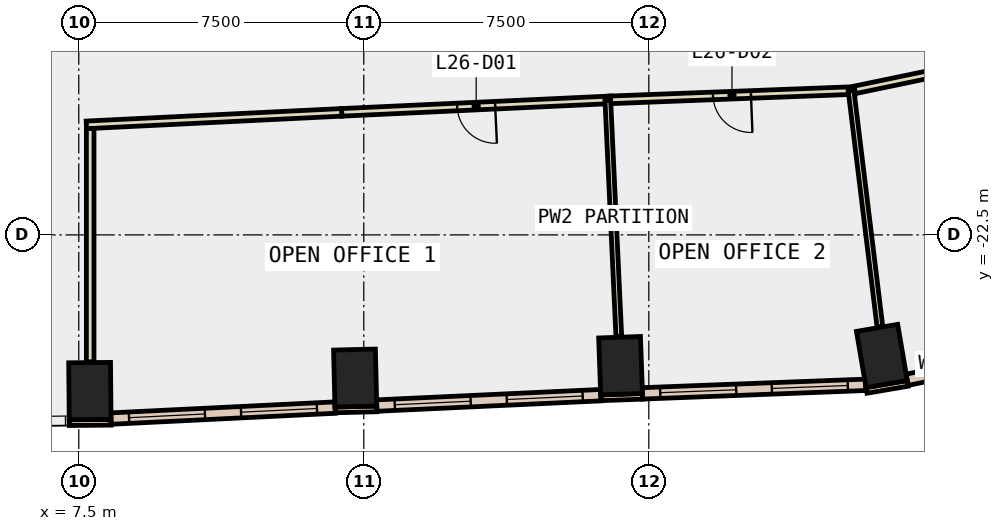
"""IFC4 building model, lengths in metres.
Left out: names, types, materials, properties, quantities, classifications, styles, units other than length and angle.
Written with IfcOpenShell. Run it as: python <this file> out.ifc"""

import sys

from ifc_helpers import new_model, si_unit, direction, frame, frame_2d, origin, origin_2d, place, context, subcontext, project, spatial, rectangle, extrude, element, fill, save


model = new_model("IFC4")
c1 = context("Model", 3, precision=1e-05, world=origin(), true_north=direction((0.0, 1.0)))
c2 = subcontext(c1, "Body", "Model", "MODEL_VIEW")
j1 = project(units=[si_unit("LENGTHUNIT", "METRE"), si_unit("PLANEANGLEUNIT", "RADIAN")], contexts=[c1])
p1 = place(None, origin())
s1 = spatial("IfcSite", under=j1, at=p1, CompositionType="ELEMENT")
p2 = place(p1, origin())
s2 = spatial("IfcBuilding", under=s1, at=p2, CompositionType="ELEMENT")
p3 = place(p2, frame((0.0, 0.0, 120.2)))
s3 = spatial("IfcBuildingStorey", under=s2, at=p3, CompositionType="ELEMENT", Elevation=120.2)
for number, where, z_axis, x_axis in (
    (1, (7.792, -26.61, -0.4), (0.0, 0.0, 1.0), (1.0, 0.009, 0.0)),
    (2, (14.773, -26.267, -0.4), (0.0, 0.0, 1.0), (1.0, 0.024, 0.0)),
    (3, (21.757, -25.942, -0.4), (0.0, 0.0, 1.0), (0.999, 0.035, 0.0)),
    (4, (28.633, -25.686, -0.4), (0.0, 0.0, 1.0), (0.986, 0.168, 0.0)),
):
    element("IfcColumn", number, at=place(p3, frame(where, z_axis=z_axis, x_axis=x_axis)), inside=s3, PredefinedType="COLUMN", context=c2, shape_type="SweptSolid", body=[
        extrude(rectangle(XDim=1.1, YDim=1.5, at=origin_2d()), origin(), (0.0, 0.0, 1.0), 4.2),
    ])
p4 = place(p3, frame((7.249, -27.44, 0.0), z_axis=(0.0, 0.0, 1.0), x_axis=(0.99995860686, 0.009098602504, 0.0)))
e5 = element("IfcWall", 5, at=p4, inside=s3, PredefinedType="STANDARD", context=c2, shape_type="SweptSolid", body=[
    extrude(rectangle(XDim=1.1, YDim=0.15, at=frame_2d((0.55, 0.0))), origin(), (0.0, 0.0, 1.0), 3.8),
])
p5 = place(p3, frame((14.243, -27.105, 0.0), z_axis=(0.0, 0.0, 1.0), x_axis=(0.999723421029, 0.023517683673, 0.0)))
e6 = element("IfcWall", 6, at=p5, inside=s3, PredefinedType="STANDARD", context=c2, shape_type="SweptSolid", body=[
    extrude(rectangle(XDim=1.1, YDim=0.15, at=frame_2d((0.55, 0.0))), origin(), (0.0, 0.0, 1.0), 3.8),
])
p6 = place(p3, frame((21.237, -26.786, 0.0), z_axis=(0.0, 0.0, 1.0), x_axis=(0.999376638472, 0.035303462679, 0.0)))
e7 = element("IfcWall", 7, at=p6, inside=s3, PredefinedType="STANDARD", context=c2, shape_type="SweptSolid", body=[
    extrude(rectangle(XDim=1.1, YDim=0.15, at=frame_2d((0.55, 0.0))), origin(), (0.0, 0.0, 1.0), 3.8),
])
p7 = place(p3, frame((28.229, -26.592, 0.0), z_axis=(0.0, 0.0, 1.0), x_axis=(0.985763338892, 0.168138751323, 0.0)))
e8 = element("IfcWall", 8, at=p7, inside=s3, PredefinedType="STANDARD", context=c2, shape_type="SweptSolid", body=[
    extrude(rectangle(XDim=1.101, YDim=0.15, at=frame_2d((0.55, 0.0))), origin(), (0.0, 0.0, 1.0), 3.8),
])
p8 = place(p3, frame((8.347, -27.333, 0.0), z_axis=(0.0, 0.0, 1.0), x_axis=(0.998800343021, 0.048968099633, 0.0)))
e9 = element("IfcWall", 9, at=p8, inside=s3, PredefinedType="STANDARD", context=c2, shape_type="SweptSolid", body=[
    extrude(rectangle(XDim=5.903, YDim=0.3, at=frame_2d((2.952, 0.0))), origin(), (0.0, 0.0, 1.0), 3.8),
])
p9 = place(p8, frame((0.476, 0.0, 0.9)))
e10 = element("IfcOpeningElement", 10, at=p9, cuts=e9, PredefinedType="OPENING", context=c2, shape_type="SweptSolid", body=[
    extrude(rectangle(XDim=2.0, YDim=2.6, at=frame_2d((1.0, 1.3))), frame((0.0, 0.16, 0.0), z_axis=(0.0, -1.0, 0.0), x_axis=(1.0, 0.0, 0.0)), (0.0, 0.0, 1.0), 0.32),
])
p10 = place(p8, frame((3.427, 0.0, 0.9)))
e11 = element("IfcOpeningElement", 11, at=p10, cuts=e9, PredefinedType="OPENING", context=c2, shape_type="SweptSolid", body=[
    extrude(rectangle(XDim=2.0, YDim=2.6, at=frame_2d((1.0, 1.3))), frame((0.0, 0.16, 0.0), z_axis=(0.0, -1.0, 0.0), x_axis=(1.0, 0.0, 0.0)), (0.0, 0.0, 1.0), 0.32),
])
p11 = place(p3, frame((15.34, -26.991, 0.0), z_axis=(0.0, 0.0, 1.0), x_axis=(0.998922139094, 0.046417238469, 0.0)))
e12 = element("IfcWall", 12, at=p11, inside=s3, PredefinedType="STANDARD", context=c2, shape_type="SweptSolid", body=[
    extrude(rectangle(XDim=5.901, YDim=0.3, at=frame_2d((2.951, 0.0))), origin(), (0.0, 0.0, 1.0), 3.8),
])
p12 = place(p11, frame((0.475, 0.0, 0.9)))
e13 = element("IfcOpeningElement", 13, at=p12, cuts=e12, PredefinedType="OPENING", context=c2, shape_type="SweptSolid", body=[
    extrude(rectangle(XDim=2.0, YDim=2.6, at=frame_2d((1.0, 1.3))), frame((0.0, 0.16, 0.0), z_axis=(0.0, -1.0, 0.0), x_axis=(1.0, 0.0, 0.0)), (0.0, 0.0, 1.0), 0.32),
])
p13 = place(p11, frame((3.426, 0.0, 0.9)))
e14 = element("IfcOpeningElement", 14, at=p13, cuts=e12, PredefinedType="OPENING", context=c2, shape_type="SweptSolid", body=[
    extrude(rectangle(XDim=2.0, YDim=2.6, at=frame_2d((1.0, 1.3))), frame((0.0, 0.16, 0.0), z_axis=(0.0, -1.0, 0.0), x_axis=(1.0, 0.0, 0.0)), (0.0, 0.0, 1.0), 0.32),
])
p14 = place(p3, frame((22.332, -26.67, 0.0), z_axis=(0.0, 0.0, 1.0), x_axis=(0.999267908582, 0.038257638169, 0.0)))
e15 = element("IfcWall", 15, at=p14, inside=s3, PredefinedType="STANDARD", context=c2, shape_type="SweptSolid", body=[
    extrude(rectangle(XDim=5.877, YDim=0.3, at=frame_2d((2.939, 0.0))), origin(), (0.0, 0.0, 1.0), 3.8),
])
p15 = place(p14, frame((0.469, 0.0, 0.9)))
e16 = element("IfcOpeningElement", 16, at=p15, cuts=e15, PredefinedType="OPENING", context=c2, shape_type="SweptSolid", body=[
    extrude(rectangle(XDim=2.0, YDim=2.6, at=frame_2d((1.0, 1.3))), frame((0.0, 0.16, 0.0), z_axis=(0.0, -1.0, 0.0), x_axis=(1.0, 0.0, 0.0)), (0.0, 0.0, 1.0), 0.32),
])
p16 = place(p14, frame((3.408, 0.0, 0.9)))
e17 = element("IfcOpeningElement", 17, at=p16, cuts=e15, PredefinedType="OPENING", context=c2, shape_type="SweptSolid", body=[
    extrude(rectangle(XDim=2.0, YDim=2.6, at=frame_2d((1.0, 1.3))), frame((0.0, 0.16, 0.0), z_axis=(0.0, -1.0, 0.0), x_axis=(1.0, 0.0, 0.0)), (0.0, 0.0, 1.0), 0.32),
])
p17 = place(p3, frame((29.297, -26.313, 0.0), z_axis=(0.0, 0.0, 1.0), x_axis=(0.979080614496, 0.203472726227, 0.0)))
e18 = element("IfcWall", 18, at=p17, inside=s3, PredefinedType="STANDARD", context=c2, shape_type="SweptSolid", body=[
    extrude(rectangle(XDim=4.05, YDim=0.3, at=frame_2d((2.025, 0.0))), origin(), (0.0, 0.0, 1.0), 3.8),
])
p18 = place(p17, frame((1.325, 0.0, 0.9)))
e19 = element("IfcOpeningElement", 19, at=p18, cuts=e18, PredefinedType="OPENING", context=c2, shape_type="SweptSolid", body=[
    extrude(rectangle(XDim=1.4, YDim=2.6, at=frame_2d((0.7, 1.3))), frame((0.0, 0.16, 0.0), z_axis=(0.0, -1.0, 0.0), x_axis=(1.0, 0.0, 0.0)), (0.0, 0.0, 1.0), 0.32),
])
p19 = place(p3, frame((21.496, -18.946, 0.0), z_axis=(0.0, 0.0, 1.0), x_axis=(-0.99891602876, -0.046548549767, 0.0)))
e20 = element("IfcWall", 20, at=p19, inside=s3, PredefinedType="PARTITIONING", context=c2, shape_type="SweptSolid", body=[
    extrude(rectangle(XDim=7.086, YDim=0.2, at=frame_2d((3.543, 0.0))), origin(), (0.0, 0.0, 1.0), 3.8),
])
p20 = place(p19, frame((3.043, 0.0, 0.0)))
e21 = element("IfcOpeningElement", 21, at=p20, cuts=e20, PredefinedType="OPENING", context=c2, shape_type="SweptSolid", body=[
    extrude(rectangle(XDim=1.0, YDim=2.1, at=frame_2d((0.5, 1.05))), frame((0.0, 0.11, 0.0), z_axis=(0.0, -1.0, 0.0), x_axis=(1.0, 0.0, 0.0)), (0.0, 0.0, 1.0), 0.22),
])
p21 = place(p3, frame((14.418, -19.276, 0.0), z_axis=(0.0, 0.0, 1.0), x_axis=(-0.998802248261, -0.04892922305, 0.0)))
e22 = element("IfcWall", 22, at=p21, inside=s3, PredefinedType="PARTITIONING", context=c2, shape_type="SweptSolid", body=[
    extrude(rectangle(XDim=6.726, YDim=0.2, at=frame_2d((3.363, 0.0))), origin(), (0.0, 0.0, 1.0), 3.8),
])
p22 = place(p3, frame((27.922, -18.7, 0.0), z_axis=(0.0, 0.0, 1.0), x_axis=(-0.999265458352, -0.038321583274, 0.0)))
e23 = element("IfcWall", 23, at=p22, inside=s3, PredefinedType="PARTITIONING", context=c2, shape_type="SweptSolid", body=[
    extrude(rectangle(XDim=6.473, YDim=0.2, at=frame_2d((3.236, 0.0))), origin(), (0.0, 0.0, 1.0), 3.8),
])
p23 = place(p22, frame((2.736, 0.0, 0.0)))
e24 = element("IfcOpeningElement", 24, at=p23, cuts=e23, PredefinedType="OPENING", context=c2, shape_type="SweptSolid", body=[
    extrude(rectangle(XDim=1.0, YDim=2.1, at=frame_2d((0.5, 1.05))), frame((0.0, 0.11, 0.0), z_axis=(0.0, -1.0, 0.0), x_axis=(1.0, 0.0, 0.0)), (0.0, 0.0, 1.0), 0.22),
])
p24 = place(p3, frame((30.209, -18.208, 0.0), z_axis=(0.0, 0.0, 1.0), x_axis=(-0.979049860969, -0.203620651545, 0.0)))
e25 = element("IfcWall", 25, at=p24, inside=s3, PredefinedType="PARTITIONING", context=c2, shape_type="SweptSolid", body=[
    extrude(rectangle(XDim=2.338, YDim=0.2, at=frame_2d((1.169, 0.0))), origin(), (0.0, 0.0, 1.0), 3.8),
])
p25 = place(p3, frame((7.8, -19.701, 0.0), z_axis=(0.0, 0.0, 1.0), x_axis=(0.0, -1.0, 0.0)))
e26 = element("IfcWall", 26, at=p25, inside=s3, PredefinedType="PARTITIONING", context=c2, shape_type="SweptSolid", body=[
    extrude(rectangle(XDim=6.139, YDim=0.2, at=frame_2d((3.07, 0.0))), origin(), (0.0, 0.0, 1.0), 3.8),
])
p26 = place(p3, frame((21.421, -18.95, 0.0), z_axis=(0.0, 0.0, 1.0), x_axis=(0.046555976109, -0.998915682672, 0.0)))
e27 = element("IfcWall", 27, at=p26, inside=s3, PredefinedType="PARTITIONING", context=c2, shape_type="SweptSolid", body=[
    extrude(rectangle(XDim=6.23, YDim=0.15, at=frame_2d((3.115, 0.0))), origin(), (0.0, 0.0, 1.0), 3.8),
])
p27 = place(p3, frame((27.822, -18.704, 0.0), z_axis=(0.0, 0.0, 1.0), x_axis=(0.121325411006, -0.992612786863, 0.0)))
e28 = element("IfcWall", 28, at=p27, inside=s3, PredefinedType="PARTITIONING", context=c2, shape_type="SweptSolid", body=[
    extrude(rectangle(XDim=6.256, YDim=0.15, at=frame_2d((3.128, 0.0))), origin(), (0.0, 0.0, 1.0), 3.8),
])
p28 = place(p9, origin())
e29 = element("IfcWindow", 29, at=p28, inside=s3, PartitioningType="SINGLE_PANEL", PredefinedType="WINDOW", context=c2, shape_type="SweptSolid", body=[
    extrude(rectangle(XDim=2.0, YDim=2.6, at=frame_2d((1.0, 1.3))), frame((0.0, 0.03, 0.0), z_axis=(0.0, -1.0, 0.0), x_axis=(1.0, 0.0, 0.0)), (0.0, 0.0, 1.0), 0.06),
])
fill(e10, e29)
p29 = place(p10, origin())
e30 = element("IfcWindow", 30, at=p29, inside=s3, PartitioningType="SINGLE_PANEL", PredefinedType="WINDOW", context=c2, shape_type="SweptSolid", body=[
    extrude(rectangle(XDim=2.0, YDim=2.6, at=frame_2d((1.0, 1.3))), frame((0.0, 0.03, 0.0), z_axis=(0.0, -1.0, 0.0), x_axis=(1.0, 0.0, 0.0)), (0.0, 0.0, 1.0), 0.06),
])
fill(e11, e30)
p30 = place(p12, origin())
e31 = element("IfcWindow", 31, at=p30, inside=s3, PartitioningType="SINGLE_PANEL", PredefinedType="WINDOW", context=c2, shape_type="SweptSolid", body=[
    extrude(rectangle(XDim=2.0, YDim=2.6, at=frame_2d((1.0, 1.3))), frame((0.0, 0.03, 0.0), z_axis=(0.0, -1.0, 0.0), x_axis=(1.0, 0.0, 0.0)), (0.0, 0.0, 1.0), 0.06),
])
fill(e13, e31)
p31 = place(p13, origin())
e32 = element("IfcWindow", 32, at=p31, inside=s3, PartitioningType="SINGLE_PANEL", PredefinedType="WINDOW", context=c2, shape_type="SweptSolid", body=[
    extrude(rectangle(XDim=2.0, YDim=2.6, at=frame_2d((1.0, 1.3))), frame((0.0, 0.03, 0.0), z_axis=(0.0, -1.0, 0.0), x_axis=(1.0, 0.0, 0.0)), (0.0, 0.0, 1.0), 0.06),
])
fill(e14, e32)
p32 = place(p15, origin())
e33 = element("IfcWindow", 33, at=p32, inside=s3, PartitioningType="SINGLE_PANEL", PredefinedType="WINDOW", context=c2, shape_type="SweptSolid", body=[
    extrude(rectangle(XDim=2.0, YDim=2.6, at=frame_2d((1.0, 1.3))), frame((0.0, 0.03, 0.0), z_axis=(0.0, -1.0, 0.0), x_axis=(1.0, 0.0, 0.0)), (0.0, 0.0, 1.0), 0.06),
])
fill(e16, e33)
p33 = place(p16, origin())
e34 = element("IfcWindow", 34, at=p33, inside=s3, PartitioningType="SINGLE_PANEL", PredefinedType="WINDOW", context=c2, shape_type="SweptSolid", body=[
    extrude(rectangle(XDim=2.0, YDim=2.6, at=frame_2d((1.0, 1.3))), frame((0.0, 0.03, 0.0), z_axis=(0.0, -1.0, 0.0), x_axis=(1.0, 0.0, 0.0)), (0.0, 0.0, 1.0), 0.06),
])
fill(e17, e34)
p34 = place(p20, origin())
e35 = element("IfcDoor", 35, at=p34, inside=s3, OperationType="SINGLE_SWING_LEFT", PredefinedType="DOOR", context=c2, shape_type="SweptSolid", body=[
    extrude(rectangle(XDim=1.0, YDim=2.1, at=frame_2d((0.5, 1.05))), frame((0.0, 0.025, 0.0), z_axis=(0.0, -1.0, 0.0), x_axis=(1.0, 0.0, 0.0)), (0.0, 0.0, 1.0), 0.05),
])
fill(e21, e35)
p35 = place(p23, origin())
e36 = element("IfcDoor", 36, at=p35, inside=s3, OperationType="SINGLE_SWING_LEFT", PredefinedType="DOOR", context=c2, shape_type="SweptSolid", body=[
    extrude(rectangle(XDim=1.0, YDim=2.1, at=frame_2d((0.5, 1.05))), frame((0.0, 0.025, 0.0), z_axis=(0.0, -1.0, 0.0), x_axis=(1.0, 0.0, 0.0)), (0.0, 0.0, 1.0), 0.05),
])
fill(e24, e36)
save(model, sys.argv[1])
